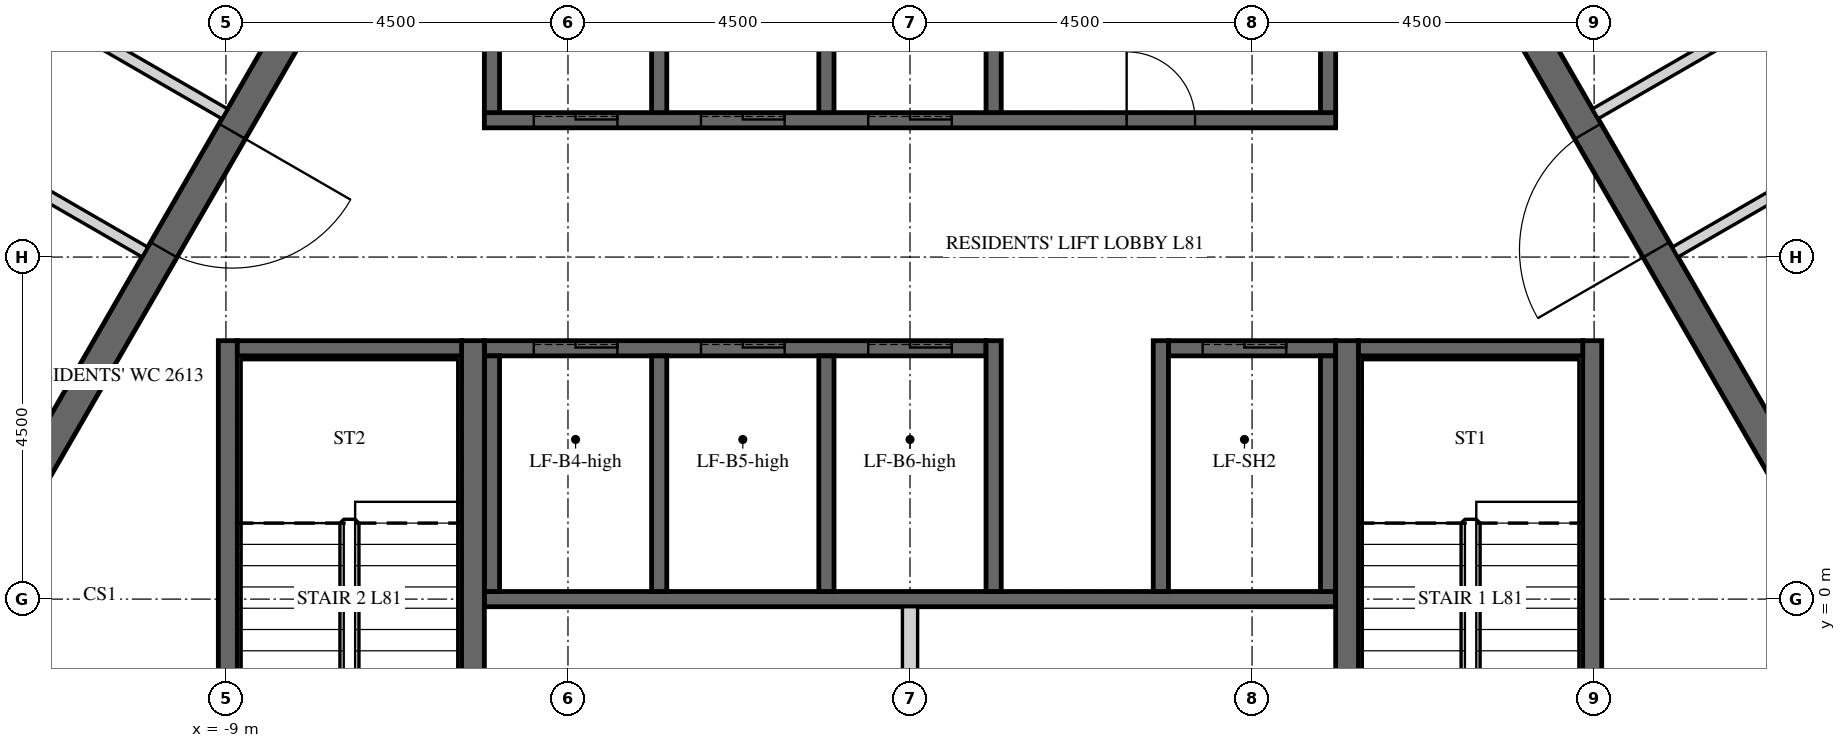
"""IFC4 building model, lengths in metres.
Left out: names, types, materials, properties, quantities, classifications, styles, units other than length and angle.
Written with IfcOpenShell. Run it as: python <this file> out.ifc"""

import sys

from ifc_helpers import new_model, si_unit, direction, frame, frame_2d, origin, place, context, subcontext, project, spatial, polyline, rectangle, outline, extrude, element, fill, save


model = new_model("IFC4")
c1 = context("Model", 3, precision=1e-05, world=origin(), true_north=direction((0.0, 1.0)))
c2 = subcontext(c1, "Body", "Model", "MODEL_VIEW")
j1 = project(units=[si_unit("LENGTHUNIT", "METRE"), si_unit("PLANEANGLEUNIT", "RADIAN")], contexts=[c1])
p1 = place(None, origin())
s1 = spatial("IfcSite", under=j1, at=p1, CompositionType="ELEMENT")
p2 = place(p1, origin())
s2 = spatial("IfcBuilding", under=s1, at=p2, CompositionType="ELEMENT")
p3 = place(p2, frame((0.0, 0.0, 334.2)))
s3 = spatial("IfcBuildingStorey", under=s2, at=p3, CompositionType="ELEMENT", Elevation=334.2)
p4 = place(p3, frame((-6.235, 10.8, -0.15), z_axis=(0.0, 0.0, 1.0), x_axis=(-0.499996419489, -0.866027470984, 0.0)))
e1 = element("IfcWall", 1, at=p4, inside=s3, PredefinedType="SHEAR", context=c2, shape_type="SweptSolid", body=[
    extrude(outline(polyline([(-0.115, -0.2), (12.586, -0.2), (12.355, 0.2), (0.115, 0.2), (-0.115, -0.2)])), origin(), (0.0, 0.0, 1.0), 3.75),
])
p5 = place(p4, frame((5.364, 0.0, 0.15)))
e2 = element("IfcOpeningElement", 2, at=p5, cuts=e1, PredefinedType="OPENING", context=c2, shape_type="SweptSolid", body=[
    extrude(rectangle(XDim=1.8, YDim=2.4, at=frame_2d((0.9, 1.2))), frame((0.0, 0.21, 0.0), z_axis=(0.0, -1.0, 0.0), x_axis=(1.0, 0.0, 0.0)), (0.0, 0.0, 1.0), 0.42),
])
p6 = place(p3, frame((-12.471, 0.0, -0.15), z_axis=(0.0, 0.0, 1.0), x_axis=(0.499996419489, -0.866027470984, 0.0)))
e3 = element("IfcWall", 3, at=p6, inside=s3, PredefinedType="SHEAR", context=c2, shape_type="SweptSolid", body=[
    extrude(outline(polyline([(-0.115, -0.2), (12.586, -0.2), (12.355, 0.2), (0.115, 0.2), (-0.115, -0.2)])), origin(), (0.0, 0.0, 1.0), 3.75),
])
p7 = place(p6, frame((5.306, 0.0, 0.15)))
e4 = element("IfcOpeningElement", 4, at=p7, cuts=e3, PredefinedType="OPENING", context=c2, shape_type="SweptSolid", body=[
    extrude(rectangle(XDim=1.8, YDim=2.4, at=frame_2d((0.9, 1.2))), frame((0.0, 0.21, 0.0), z_axis=(0.0, -1.0, 0.0), x_axis=(1.0, 0.0, 0.0)), (0.0, 0.0, 1.0), 0.42),
])
p8 = place(p3, frame((6.235, -10.8, -0.15), z_axis=(0.0, 0.0, 1.0), x_axis=(0.499996419489, 0.866027470984, 0.0)))
e5 = element("IfcWall", 5, at=p8, inside=s3, PredefinedType="SHEAR", context=c2, shape_type="SweptSolid", body=[
    extrude(outline(polyline([(-0.115, -0.2), (12.586, -0.2), (12.355, 0.2), (0.115, 0.2), (-0.115, -0.2)])), origin(), (0.0, 0.0, 1.0), 3.75),
])
p9 = place(p8, frame((5.364, 0.0, 0.15)))
e6 = element("IfcOpeningElement", 6, at=p9, cuts=e5, PredefinedType="OPENING", context=c2, shape_type="SweptSolid", body=[
    extrude(rectangle(XDim=1.8, YDim=2.4, at=frame_2d((0.9, 1.2))), frame((0.0, 0.21, 0.0), z_axis=(0.0, -1.0, 0.0), x_axis=(1.0, 0.0, 0.0)), (0.0, 0.0, 1.0), 0.42),
])
p10 = place(p3, frame((12.471, 0.0, -0.15), z_axis=(0.0, 0.0, 1.0), x_axis=(-0.499996419489, 0.866027470984, 0.0)))
e7 = element("IfcWall", 7, at=p10, inside=s3, PredefinedType="SHEAR", context=c2, shape_type="SweptSolid", body=[
    extrude(outline(polyline([(-0.115, -0.2), (12.586, -0.2), (12.355, 0.2), (0.115, 0.2), (-0.115, -0.2)])), origin(), (0.0, 0.0, 1.0), 3.75),
])
p11 = place(p10, frame((5.306, 0.0, 0.15)))
e8 = element("IfcOpeningElement", 8, at=p11, cuts=e7, PredefinedType="OPENING", context=c2, shape_type="SweptSolid", body=[
    extrude(rectangle(XDim=1.8, YDim=2.4, at=frame_2d((0.9, 1.2))), frame((0.0, 0.21, 0.0), z_axis=(0.0, -1.0, 0.0), x_axis=(1.0, 0.0, 0.0)), (0.0, 0.0, 1.0), 0.42),
])
p12 = place(p3, frame((-5.6, 6.3, -0.25), z_axis=(0.0, 0.0, 1.0), x_axis=(1.0, 0.0, 0.0)))
e9 = element("IfcWall", 9, at=p12, inside=s3, PredefinedType="SHEAR", context=c2, shape_type="SweptSolid", body=[
    extrude(rectangle(XDim=11.2, YDim=0.2, at=frame_2d((5.6, 0.0))), origin(), (0.0, 0.0, 1.0), 3.9),
])
p13 = place(p12, frame((8.45, 0.0, 0.25)))
e10 = element("IfcOpeningElement", 10, at=p13, cuts=e9, PredefinedType="OPENING", context=c2, shape_type="SweptSolid", body=[
    extrude(rectangle(XDim=0.9, YDim=2.1, at=frame_2d((0.45, 1.05))), frame((0.0, 0.11, 0.0), z_axis=(0.0, -1.0, 0.0), x_axis=(1.0, 0.0, 0.0)), (0.0, 0.0, 1.0), 0.22),
])
p14 = place(p12, frame((0.65, 0.0, 0.25)))
e11 = element("IfcOpeningElement", 11, at=p14, cuts=e9, PredefinedType="OPENING", context=c2, shape_type="SweptSolid", body=[
    extrude(rectangle(XDim=1.1, YDim=2.1, at=frame_2d((0.55, 1.05))), frame((0.0, 0.11, 0.0), z_axis=(0.0, -1.0, 0.0), x_axis=(1.0, 0.0, 0.0)), (0.0, 0.0, 1.0), 0.22),
])
p15 = place(p12, frame((2.85, 0.0, 0.25)))
e12 = element("IfcOpeningElement", 12, at=p15, cuts=e9, PredefinedType="OPENING", context=c2, shape_type="SweptSolid", body=[
    extrude(rectangle(XDim=1.1, YDim=2.1, at=frame_2d((0.55, 1.05))), frame((0.0, 0.11, 0.0), z_axis=(0.0, -1.0, 0.0), x_axis=(1.0, 0.0, 0.0)), (0.0, 0.0, 1.0), 0.22),
])
p16 = place(p12, frame((5.05, 0.0, 0.25)))
e13 = element("IfcOpeningElement", 13, at=p16, cuts=e9, PredefinedType="OPENING", context=c2, shape_type="SweptSolid", body=[
    extrude(rectangle(XDim=1.1, YDim=2.1, at=frame_2d((0.55, 1.05))), frame((0.0, 0.11, 0.0), z_axis=(0.0, -1.0, 0.0), x_axis=(1.0, 0.0, 0.0)), (0.0, 0.0, 1.0), 0.22),
])
for number, where, z_axis, x_axis in (
    (14, (-5.5, 6.4, -0.25), (0.0, 0.0, 1.0), (0.0, 1.0, 0.0)),
    (15, (-3.3, 6.4, -0.25), (0.0, 0.0, 1.0), (0.0, 1.0, 0.0)),
    (16, (-1.1, 6.4, -0.25), (0.0, 0.0, 1.0), (0.0, 1.0, 0.0)),
    (17, (1.1, 6.4, -0.25), (0.0, 0.0, 1.0), (0.0, 1.0, 0.0)),
    (18, (5.5, 6.4, -0.25), (0.0, 0.0, 1.0), (0.0, 1.0, 0.0)),
):
    element("IfcWall", number, at=place(p3, frame(where, z_axis=z_axis, x_axis=x_axis)), inside=s3, PredefinedType="SHEAR", context=c2, shape_type="SweptSolid", body=[
        extrude(rectangle(XDim=2.9, YDim=0.2, at=frame_2d((1.45, 0.0))), origin(), (0.0, 0.0, 1.0), 3.9),
    ])
p17 = place(p3, frame((-5.6, 3.3, -0.25), z_axis=(0.0, 0.0, 1.0), x_axis=(1.0, 0.0, 0.0)))
e19 = element("IfcWall", 19, at=p17, inside=s3, PredefinedType="SHEAR", context=c2, shape_type="SweptSolid", body=[
    extrude(rectangle(XDim=6.6, YDim=0.2, at=frame_2d((3.3, 0.0))), origin(), (0.0, 0.0, 1.0), 3.9),
])
p18 = place(p17, frame((0.65, 0.0, 0.25)))
e20 = element("IfcOpeningElement", 20, at=p18, cuts=e19, PredefinedType="OPENING", context=c2, shape_type="SweptSolid", body=[
    extrude(rectangle(XDim=1.1, YDim=2.1, at=frame_2d((0.55, 1.05))), frame((0.0, 0.11, 0.0), z_axis=(0.0, -1.0, 0.0), x_axis=(1.0, 0.0, 0.0)), (0.0, 0.0, 1.0), 0.22),
])
p19 = place(p17, frame((2.85, 0.0, 0.25)))
e21 = element("IfcOpeningElement", 21, at=p19, cuts=e19, PredefinedType="OPENING", context=c2, shape_type="SweptSolid", body=[
    extrude(rectangle(XDim=1.1, YDim=2.1, at=frame_2d((0.55, 1.05))), frame((0.0, 0.11, 0.0), z_axis=(0.0, -1.0, 0.0), x_axis=(1.0, 0.0, 0.0)), (0.0, 0.0, 1.0), 0.22),
])
p20 = place(p17, frame((5.05, 0.0, 0.25)))
e22 = element("IfcOpeningElement", 22, at=p20, cuts=e19, PredefinedType="OPENING", context=c2, shape_type="SweptSolid", body=[
    extrude(rectangle(XDim=1.1, YDim=2.1, at=frame_2d((0.55, 1.05))), frame((0.0, 0.11, 0.0), z_axis=(0.0, -1.0, 0.0), x_axis=(1.0, 0.0, 0.0)), (0.0, 0.0, 1.0), 0.22),
])
p21 = place(p3, frame((3.4, 3.3, -0.25), z_axis=(0.0, 0.0, 1.0), x_axis=(1.0, 0.0, 0.0)))
e23 = element("IfcWall", 23, at=p21, inside=s3, PredefinedType="SHEAR", context=c2, shape_type="SweptSolid", body=[
    extrude(rectangle(XDim=2.2, YDim=0.2, at=frame_2d((1.1, 0.0))), origin(), (0.0, 0.0, 1.0), 3.9),
])
p22 = place(p21, frame((0.45, 0.0, 0.25)))
e24 = element("IfcOpeningElement", 24, at=p22, cuts=e23, PredefinedType="OPENING", context=c2, shape_type="SweptSolid", body=[
    extrude(rectangle(XDim=1.1, YDim=2.1, at=frame_2d((0.55, 1.05))), frame((0.0, 0.11, 0.0), z_axis=(0.0, -1.0, 0.0), x_axis=(1.0, 0.0, 0.0)), (0.0, 0.0, 1.0), 0.22),
])
p23 = place(p3, frame((-5.6, 0.0, -0.25), z_axis=(0.0, 0.0, 1.0), x_axis=(1.0, 0.0, 0.0)))
e25 = element("IfcWall", 25, at=p23, inside=s3, PredefinedType="SHEAR", context=c2, shape_type="SweptSolid", body=[
    extrude(rectangle(XDim=11.2, YDim=0.2, at=frame_2d((5.6, 0.0))), origin(), (0.0, 0.0, 1.0), 3.9),
])
for number, where, z_axis, x_axis in (
    (26, (-5.5, 0.1, -0.25), (0.0, 0.0, 1.0), (0.0, 1.0, 0.0)),
    (27, (-3.3, 0.1, -0.25), (0.0, 0.0, 1.0), (0.0, 1.0, 0.0)),
    (28, (-1.1, 0.1, -0.25), (0.0, 0.0, 1.0), (0.0, 1.0, 0.0)),
):
    element("IfcWall", number, at=place(p3, frame(where, z_axis=z_axis, x_axis=x_axis)), inside=s3, PredefinedType="SHEAR", context=c2, shape_type="SweptSolid", body=[
        extrude(rectangle(XDim=3.1, YDim=0.2, at=frame_2d((1.55, 0.0))), origin(), (0.0, 0.0, 1.0), 3.9),
    ])
for number, where, z_axis, x_axis in (
    (29, (1.1, 0.1, -0.25), (0.0, 0.0, 1.0), (0.0, 1.0, 0.0)),
    (30, (3.3, 0.1, -0.25), (0.0, 0.0, 1.0), (0.0, 1.0, 0.0)),
):
    element("IfcWall", number, at=place(p3, frame(where, z_axis=z_axis, x_axis=x_axis)), inside=s3, PredefinedType="SHEAR", context=c2, shape_type="SweptSolid", body=[
        extrude(rectangle(XDim=3.3, YDim=0.2, at=frame_2d((1.65, 0.0))), origin(), (0.0, 0.0, 1.0), 3.9),
    ])
p24 = place(p3, frame((5.5, 0.1, -0.25), z_axis=(0.0, 0.0, 1.0), x_axis=(0.0, 1.0, 0.0)))
e31 = element("IfcWall", 31, at=p24, inside=s3, PredefinedType="SHEAR", context=c2, shape_type="SweptSolid", body=[
    extrude(rectangle(XDim=3.1, YDim=0.2, at=frame_2d((1.55, 0.0))), origin(), (0.0, 0.0, 1.0), 3.9),
])
p25 = place(p3, frame((0.0, -6.2, 0.0), z_axis=(0.0, 0.0, 1.0), x_axis=(0.0, 1.0, 0.0)))
e32 = element("IfcWall", 32, at=p25, inside=s3, PredefinedType="PARTITIONING", context=c2, shape_type="SweptSolid", body=[
    extrude(rectangle(XDim=6.1, YDim=0.2, at=frame_2d((3.05, 0.0))), origin(), (0.0, 0.0, 1.0), 3.65),
])
p26 = place(p3, frame((5.75, -3.4, -0.25), z_axis=(0.0, 0.0, 1.0), x_axis=(0.0, 1.0, 0.0)))
e33 = element("IfcWall", 33, at=p26, inside=s3, PredefinedType="SHEAR", context=c2, shape_type="SweptSolid", body=[
    extrude(rectangle(XDim=6.8, YDim=0.3, at=frame_2d((3.4, 0.0))), origin(), (0.0, 0.0, 1.0), 3.9),
])
p27 = place(p3, frame((8.975, -3.4, -0.25), z_axis=(0.0, 0.0, 1.0), x_axis=(0.0, 1.0, 0.0)))
e34 = element("IfcWall", 34, at=p27, inside=s3, PredefinedType="SHEAR", context=c2, shape_type="SweptSolid", body=[
    extrude(rectangle(XDim=6.8, YDim=0.25, at=frame_2d((3.4, 0.0))), origin(), (0.0, 0.0, 1.0), 3.9),
])
p28 = place(p3, frame((5.9, 3.3, -0.25), z_axis=(0.0, 0.0, 1.0), x_axis=(1.0, 0.0, 0.0)))
e35 = element("IfcWall", 35, at=p28, inside=s3, PredefinedType="SHEAR", context=c2, shape_type="SweptSolid", body=[
    extrude(rectangle(XDim=2.95, YDim=0.2, at=frame_2d((1.475, 0.0))), origin(), (0.0, 0.0, 1.0), 3.9),
])
p29 = place(p3, frame((-5.75, -3.4, -0.25), z_axis=(0.0, 0.0, 1.0), x_axis=(0.0, 1.0, 0.0)))
e36 = element("IfcWall", 36, at=p29, inside=s3, PredefinedType="SHEAR", context=c2, shape_type="SweptSolid", body=[
    extrude(rectangle(XDim=6.8, YDim=0.3, at=frame_2d((3.4, 0.0))), origin(), (0.0, 0.0, 1.0), 3.9),
])
p30 = place(p3, frame((-8.975, -3.4, -0.25), z_axis=(0.0, 0.0, 1.0), x_axis=(0.0, 1.0, 0.0)))
e37 = element("IfcWall", 37, at=p30, inside=s3, PredefinedType="SHEAR", context=c2, shape_type="SweptSolid", body=[
    extrude(rectangle(XDim=6.8, YDim=0.25, at=frame_2d((3.4, 0.0))), origin(), (0.0, 0.0, 1.0), 3.9),
])
p31 = place(p3, frame((-8.85, 3.3, -0.25), z_axis=(0.0, 0.0, 1.0), x_axis=(1.0, 0.0, 0.0)))
e38 = element("IfcWall", 38, at=p31, inside=s3, PredefinedType="SHEAR", context=c2, shape_type="SweptSolid", body=[
    extrude(rectangle(XDim=2.95, YDim=0.2, at=frame_2d((1.475, 0.0))), origin(), (0.0, 0.0, 1.0), 3.9),
])
p32 = place(p3, frame((-8.247, 16.625, 0.0), z_axis=(0.0, 0.0, 1.0), x_axis=(-0.438376416131, -0.89879147625, 0.0)))
e39 = element("IfcWall", 39, at=p32, inside=s3, PredefinedType="PARTITIONING", context=c2, shape_type="SweptSolid", body=[
    extrude(rectangle(XDim=16.606, YDim=0.15, at=frame_2d((8.303, 0.0))), origin(), (0.0, 0.0, 1.0), 2.838),
])
p33 = place(p32, frame((6.103, 0.0, 0.0)))
e40 = element("IfcOpeningElement", 40, at=p33, cuts=e39, PredefinedType="OPENING", context=c2, shape_type="SweptSolid", body=[
    extrude(rectangle(XDim=1.0, YDim=2.1, at=frame_2d((0.5, 1.05))), frame((0.0, 0.085, 0.0), z_axis=(0.0, -1.0, 0.0), x_axis=(1.0, 0.0, 0.0)), (0.0, 0.0, 1.0), 0.17),
])
p34 = place(p3, frame((-9.016, 6.384, 0.0), z_axis=(0.0, 0.0, 1.0), x_axis=(-0.866030286288, 0.49999154316, 0.0)))
e41 = element("IfcWall", 41, at=p34, inside=s3, PredefinedType="PARTITIONING", context=c2, shape_type="SweptSolid", body=[
    extrude(rectangle(XDim=2.304, YDim=0.15, at=frame_2d((1.152, 0.0))), origin(), (0.0, 0.0, 1.0), 2.838),
])
p35 = place(p3, frame((-11.868, 5.606, 0.0), z_axis=(0.0, 0.0, 1.0), x_axis=(0.866033244403, -0.499986419405, 0.0)))
e42 = element("IfcWall", 42, at=p35, inside=s3, PredefinedType="PARTITIONING", context=c2, shape_type="SweptSolid", body=[
    extrude(rectangle(XDim=2.082, YDim=0.15, at=frame_2d((1.041, 0.0))), origin(), (0.0, 0.0, 1.0), 2.838),
])
p36 = place(p3, frame((18.521, -1.171, 0.0), z_axis=(0.0, 0.0, 1.0), x_axis=(-0.559191021435, 0.829038842001, 0.0)))
e43 = element("IfcWall", 43, at=p36, inside=s3, PredefinedType="PARTITIONING", context=c2, shape_type="SweptSolid", body=[
    extrude(rectangle(XDim=16.605, YDim=0.15, at=frame_2d((8.303, 0.0))), origin(), (0.0, 0.0, 1.0), 2.838),
])
p37 = place(p36, frame((9.703, 0.0, 0.0)))
e44 = element("IfcOpeningElement", 44, at=p37, cuts=e43, PredefinedType="OPENING", context=c2, shape_type="SweptSolid", body=[
    extrude(rectangle(XDim=1.0, YDim=2.1, at=frame_2d((0.5, 1.05))), frame((0.0, 0.085, 0.0), z_axis=(0.0, -1.0, 0.0), x_axis=(1.0, 0.0, 0.0)), (0.0, 0.0, 1.0), 0.17),
])
p38 = place(p3, frame((10.066, 4.566, 0.0), z_axis=(0.0, 0.0, 1.0), x_axis=(0.866034075723, 0.499984979461, 0.0)))
e45 = element("IfcWall", 45, at=p38, inside=s3, PredefinedType="PARTITIONING", context=c2, shape_type="SweptSolid", body=[
    extrude(rectangle(XDim=2.308, YDim=0.15, at=frame_2d((1.154, 0.0))), origin(), (0.0, 0.0, 1.0), 2.838),
])
p39 = place(p3, frame((10.822, 7.427, 0.0), z_axis=(0.0, 0.0, 1.0), x_axis=(-0.866016009309, -0.500016271356, 0.0)))
e46 = element("IfcWall", 46, at=p39, inside=s3, PredefinedType="PARTITIONING", context=c2, shape_type="SweptSolid", body=[
    extrude(rectangle(XDim=2.086, YDim=0.15, at=frame_2d((1.043, 0.0))), origin(), (0.0, 0.0, 1.0), 2.838),
])
p40 = place(p5, origin())
e47 = element("IfcDoor", 47, at=p40, inside=s3, OperationType="DOUBLE_DOOR_SINGLE_SWING", PredefinedType="DOOR", context=c2, shape_type="SweptSolid", body=[
    extrude(rectangle(XDim=1.8, YDim=2.4, at=frame_2d((0.9, 1.2))), frame((0.0, 0.025, 0.0), z_axis=(0.0, -1.0, 0.0), x_axis=(1.0, 0.0, 0.0)), (0.0, 0.0, 1.0), 0.05),
])
fill(e2, e47)
p41 = place(p11, origin())
e48 = element("IfcDoor", 48, at=p41, inside=s3, OperationType="DOUBLE_DOOR_SINGLE_SWING", PredefinedType="DOOR", context=c2, shape_type="SweptSolid", body=[
    extrude(rectangle(XDim=1.8, YDim=2.4, at=frame_2d((0.9, 1.2))), frame((0.0, 0.025, 0.0), z_axis=(0.0, -1.0, 0.0), x_axis=(1.0, 0.0, 0.0)), (0.0, 0.0, 1.0), 0.05),
])
fill(e8, e48)
p42 = place(p13, origin())
e49 = element("IfcDoor", 49, at=p42, inside=s3, OperationType="SINGLE_SWING_LEFT", PredefinedType="DOOR", context=c2, shape_type="SweptSolid", body=[
    extrude(rectangle(XDim=0.9, YDim=2.1, at=frame_2d((0.45, 1.05))), frame((0.0, 0.025, 0.0), z_axis=(0.0, -1.0, 0.0), x_axis=(1.0, 0.0, 0.0)), (0.0, 0.0, 1.0), 0.05),
])
fill(e10, e49)
p43 = place(p14, origin())
e50 = element("IfcDoor", 50, at=p43, inside=s3, OperationType="SLIDING_TO_LEFT", PredefinedType="DOOR", context=c2, shape_type="SweptSolid", body=[
    extrude(rectangle(XDim=1.1, YDim=2.1, at=frame_2d((0.55, 1.05))), frame((0.0, 0.025, 0.0), z_axis=(0.0, -1.0, 0.0), x_axis=(1.0, 0.0, 0.0)), (0.0, 0.0, 1.0), 0.05),
])
fill(e11, e50)
p44 = place(p15, origin())
e51 = element("IfcDoor", 51, at=p44, inside=s3, OperationType="SLIDING_TO_LEFT", PredefinedType="DOOR", context=c2, shape_type="SweptSolid", body=[
    extrude(rectangle(XDim=1.1, YDim=2.1, at=frame_2d((0.55, 1.05))), frame((0.0, 0.025, 0.0), z_axis=(0.0, -1.0, 0.0), x_axis=(1.0, 0.0, 0.0)), (0.0, 0.0, 1.0), 0.05),
])
fill(e12, e51)
p45 = place(p16, origin())
e52 = element("IfcDoor", 52, at=p45, inside=s3, OperationType="SLIDING_TO_LEFT", PredefinedType="DOOR", context=c2, shape_type="SweptSolid", body=[
    extrude(rectangle(XDim=1.1, YDim=2.1, at=frame_2d((0.55, 1.05))), frame((0.0, 0.025, 0.0), z_axis=(0.0, -1.0, 0.0), x_axis=(1.0, 0.0, 0.0)), (0.0, 0.0, 1.0), 0.05),
])
fill(e13, e52)
p46 = place(p18, origin())
e53 = element("IfcDoor", 53, at=p46, inside=s3, OperationType="SLIDING_TO_LEFT", PredefinedType="DOOR", context=c2, shape_type="SweptSolid", body=[
    extrude(rectangle(XDim=1.1, YDim=2.1, at=frame_2d((0.55, 1.05))), frame((0.0, 0.025, 0.0), z_axis=(0.0, -1.0, 0.0), x_axis=(1.0, 0.0, 0.0)), (0.0, 0.0, 1.0), 0.05),
])
fill(e20, e53)
p47 = place(p19, origin())
e54 = element("IfcDoor", 54, at=p47, inside=s3, OperationType="SLIDING_TO_LEFT", PredefinedType="DOOR", context=c2, shape_type="SweptSolid", body=[
    extrude(rectangle(XDim=1.1, YDim=2.1, at=frame_2d((0.55, 1.05))), frame((0.0, 0.025, 0.0), z_axis=(0.0, -1.0, 0.0), x_axis=(1.0, 0.0, 0.0)), (0.0, 0.0, 1.0), 0.05),
])
fill(e21, e54)
p48 = place(p20, origin())
e55 = element("IfcDoor", 55, at=p48, inside=s3, OperationType="SLIDING_TO_LEFT", PredefinedType="DOOR", context=c2, shape_type="SweptSolid", body=[
    extrude(rectangle(XDim=1.1, YDim=2.1, at=frame_2d((0.55, 1.05))), frame((0.0, 0.025, 0.0), z_axis=(0.0, -1.0, 0.0), x_axis=(1.0, 0.0, 0.0)), (0.0, 0.0, 1.0), 0.05),
])
fill(e22, e55)
p49 = place(p22, origin())
e56 = element("IfcDoor", 56, at=p49, inside=s3, OperationType="SLIDING_TO_LEFT", PredefinedType="DOOR", context=c2, shape_type="SweptSolid", body=[
    extrude(rectangle(XDim=1.1, YDim=2.1, at=frame_2d((0.55, 1.05))), frame((0.0, 0.025, 0.0), z_axis=(0.0, -1.0, 0.0), x_axis=(1.0, 0.0, 0.0)), (0.0, 0.0, 1.0), 0.05),
])
fill(e24, e56)
save(model, sys.argv[1])
